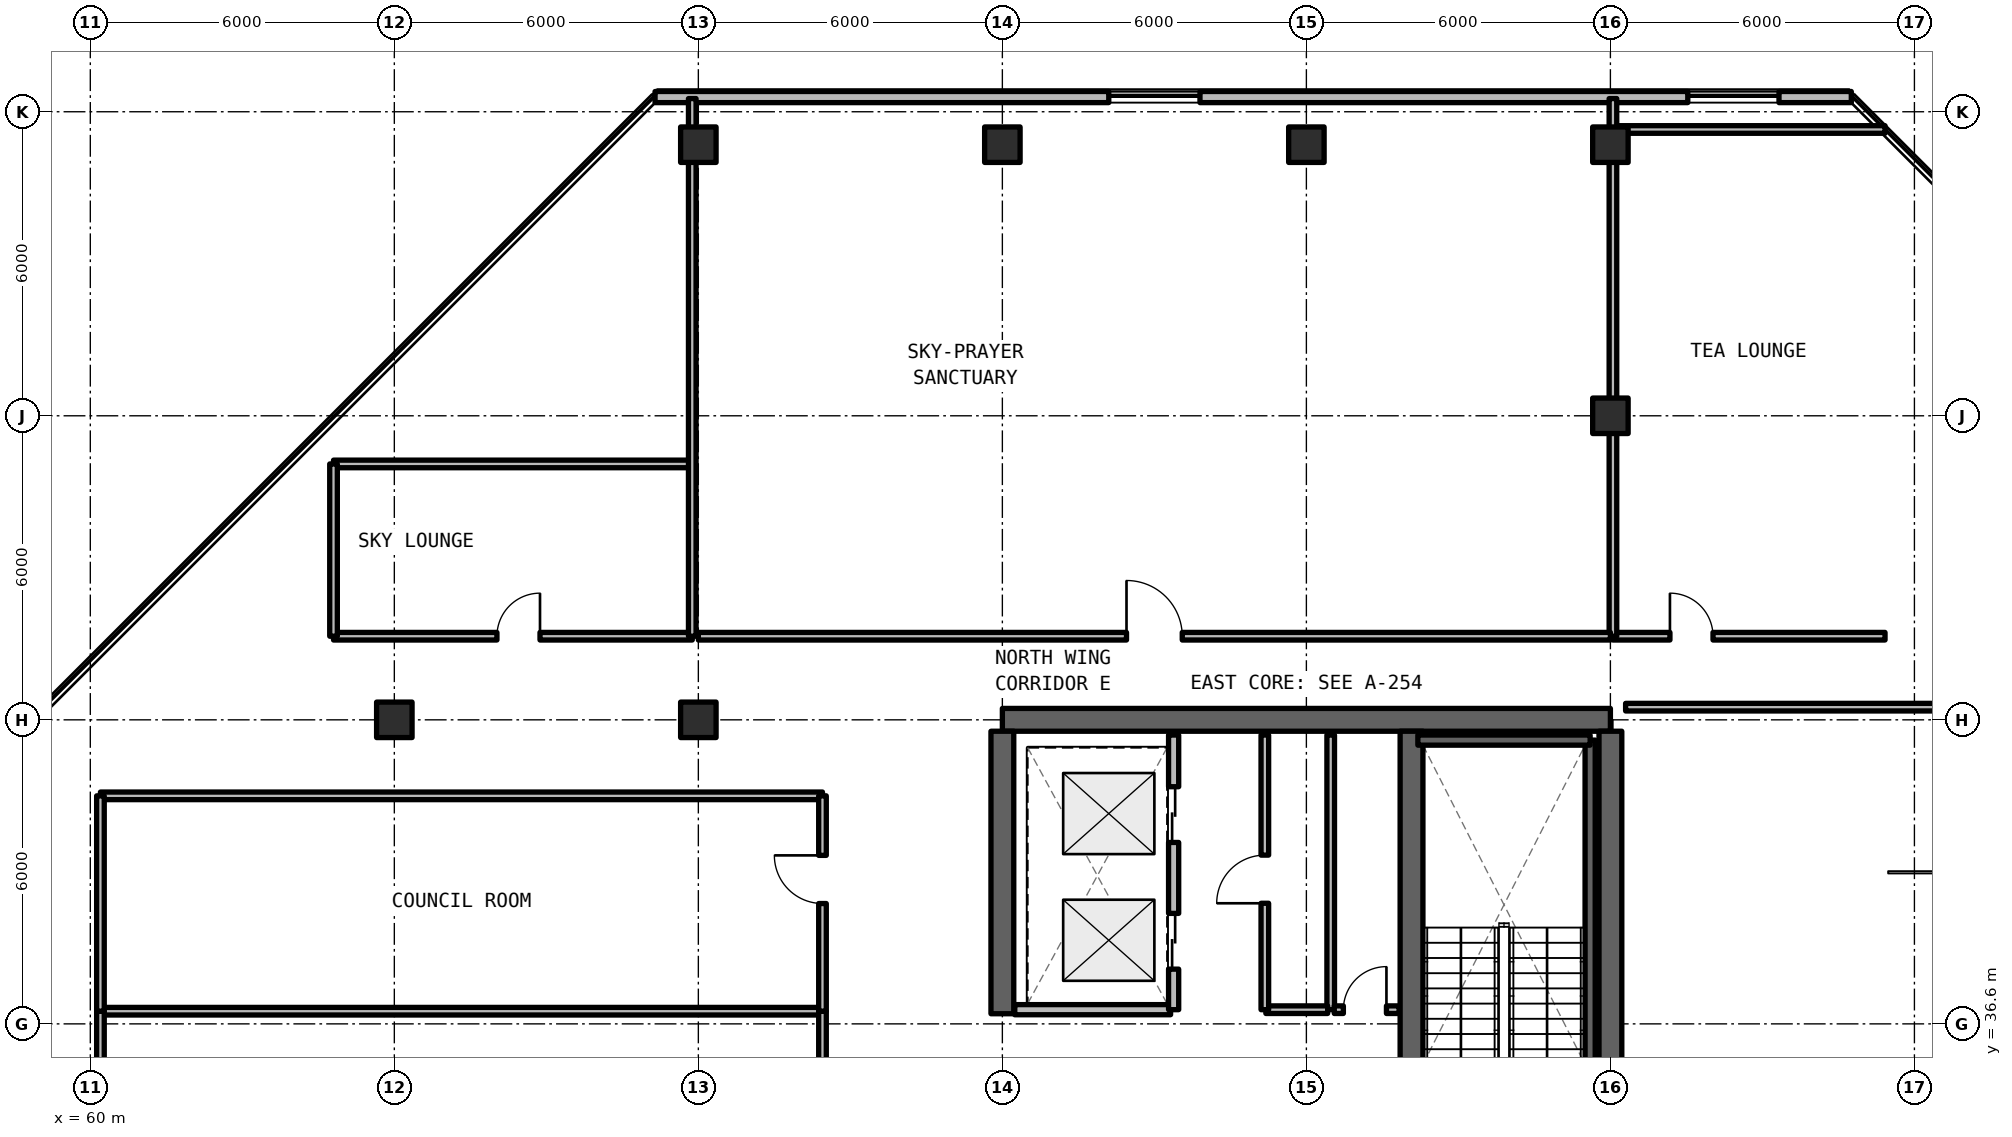
"""IFC4 building model, lengths in metres.
Left out: names, types, materials, properties, quantities, classifications, styles, units other than length and angle.
Written with IfcOpenShell. Run it as: python <this file> out.ifc"""

import sys

from ifc_helpers import new_model, si_unit, direction, frame, frame_2d, origin, origin_2d, place, context, subcontext, project, spatial, rectangle, extrude, element, fill, save


model = new_model("IFC4")
c1 = context("Model", 3, precision=1e-05, world=origin(), true_north=direction((0.0, 1.0)))
c2 = subcontext(c1, "Body", "Model", "MODEL_VIEW")
j1 = project(units=[si_unit("LENGTHUNIT", "METRE"), si_unit("PLANEANGLEUNIT", "RADIAN")], contexts=[c1])
p1 = place(None, origin())
s1 = spatial("IfcSite", under=j1, at=p1, CompositionType="ELEMENT")
p2 = place(p1, origin())
s2 = spatial("IfcBuilding", under=s1, at=p2, CompositionType="ELEMENT")
p3 = place(p2, frame((0.0, 0.0, 235.95)))
s3 = spatial("IfcBuildingStorey", under=s2, at=p3, CompositionType="ELEMENT", Elevation=235.95)
p4 = place(p3, frame((90.0, 42.6, 0.0), z_axis=(0.0, 0.0, 1.0), x_axis=(-1.0, 0.0, 0.0)))
e1 = element("IfcWall", 1, at=p4, inside=s3, PredefinedType="SHEAR", context=c2, shape_type="SweptSolid", body=[
    extrude(rectangle(XDim=12.0, YDim=0.45, at=frame_2d((6.0, 0.0))), origin(), (0.0, 0.0, 1.0), 3.3),
])
p5 = place(p3, frame((90.0, 24.825, 0.0), z_axis=(0.0, 0.0, 1.0), x_axis=(0.0, 1.0, 0.0)))
e2 = element("IfcWall", 2, at=p5, inside=s3, PredefinedType="SHEAR", context=c2, shape_type="SweptSolid", body=[
    extrude(rectangle(XDim=17.55, YDim=0.45, at=frame_2d((8.775, 0.0))), origin(), (0.0, 0.0, 1.0), 3.3),
])
p6 = place(p3, frame((78.0, 36.8, 0.0), z_axis=(0.0, 0.0, 1.0), x_axis=(0.0, 1.0, 0.0)))
e3 = element("IfcWall", 3, at=p6, inside=s3, PredefinedType="SHEAR", context=c2, shape_type="SweptSolid", body=[
    extrude(rectangle(XDim=5.575, YDim=0.45, at=frame_2d((2.788, 0.0))), origin(), (0.0, 0.0, 1.0), 3.3),
])
p7 = place(p3, frame((86.075, 24.825, 0.0), z_axis=(0.0, 0.0, 1.0), x_axis=(0.0, 1.0, 0.0)))
e4 = element("IfcWall", 4, at=p7, inside=s3, PredefinedType="SHEAR", context=c2, shape_type="SweptSolid", body=[
    extrude(rectangle(XDim=17.55, YDim=0.45, at=frame_2d((8.775, 0.0))), origin(), (0.0, 0.0, 1.0), 3.3),
])
p8 = place(p7, frame((0.425, 0.0, 0.0)))
e5 = element("IfcOpeningElement", 5, at=p8, cuts=e4, PredefinedType="OPENING", context=c2, shape_type="SweptSolid", body=[
    extrude(rectangle(XDim=1.15, YDim=2.15, at=frame_2d((0.575, 1.075))), frame((0.0, 0.235, 0.0), z_axis=(0.0, -1.0, 0.0), x_axis=(1.0, 0.0, 0.0)), (0.0, 0.0, 1.0), 0.47),
])
p9 = place(p7, frame((9.625, 0.0, 0.0)))
e6 = element("IfcOpeningElement", 6, at=p9, cuts=e4, PredefinedType="OPENING", context=c2, shape_type="SweptSolid", body=[
    extrude(rectangle(XDim=1.15, YDim=2.15, at=frame_2d((0.575, 1.075))), frame((0.0, 0.235, 0.0), z_axis=(0.0, -1.0, 0.0), x_axis=(1.0, 0.0, 0.0)), (0.0, 0.0, 1.0), 0.47),
])
for number, where, z_axis, x_axis in (
    (7, (66.0, 42.6, 0.0), (0.0, 0.0, 1.0), (1.0, 0.0, 0.0)),
    (8, (72.0, 42.6, 0.0), (0.0, 0.0, 1.0), (1.0, 0.0, 0.0)),
    (9, (90.0, 48.6, 0.0), (0.0, 0.0, 1.0), (1.0, 0.0, 0.0)),
    (10, (72.0, 53.95, 0.0), (0.0, 0.0, 1.0), (1.0, 0.0, 0.0)),
    (11, (78.0, 53.95, 0.0), (0.0, 0.0, 1.0), (1.0, 0.0, 0.0)),
    (12, (84.0, 53.95, 0.0), (0.0, 0.0, 1.0), (1.0, 0.0, 0.0)),
    (13, (90.0, 53.95, 0.0), (0.0, 0.0, 1.0), (1.0, 0.0, 0.0)),
):
    element("IfcColumn", number, at=place(p3, frame(where, z_axis=z_axis, x_axis=x_axis)), inside=s3, PredefinedType="COLUMN", context=c2, shape_type="SweptSolid", body=[
        extrude(rectangle(XDim=0.7, YDim=0.7, at=origin_2d()), origin(), (0.0, 0.0, 1.0), 3.3),
    ])
p10 = place(p3, frame((94.754, 54.89, 0.0), z_axis=(0.0, 0.0, 1.0), x_axis=(-1.0, 0.0, 0.0)))
e14 = element("IfcWall", 14, at=p10, inside=s3, PredefinedType="SOLIDWALL", context=c2, shape_type="SweptSolid", body=[
    extrude(rectangle(XDim=23.609, YDim=0.22, at=frame_2d((11.804, 0.0))), origin(), (0.0, 0.0, 1.0), 3.08),
])
p11 = place(p10, frame((1.427, 0.0, 0.78)))
e15 = element("IfcOpeningElement", 15, at=p11, cuts=e14, PredefinedType="OPENING", context=c2, shape_type="SweptSolid", body=[
    extrude(rectangle(XDim=1.8, YDim=1.66, at=frame_2d((0.9, 0.83))), frame((0.0, 0.12, 0.0), z_axis=(0.0, -1.0, 0.0), x_axis=(1.0, 0.0, 0.0)), (0.0, 0.0, 1.0), 0.24),
])
p12 = place(p10, frame((12.854, 0.0, 0.78)))
e16 = element("IfcOpeningElement", 16, at=p12, cuts=e14, PredefinedType="OPENING", context=c2, shape_type="SweptSolid", body=[
    extrude(rectangle(XDim=1.8, YDim=1.66, at=frame_2d((0.9, 0.83))), frame((0.0, 0.12, 0.0), z_axis=(0.0, -1.0, 0.0), x_axis=(1.0, 0.0, 0.0)), (0.0, 0.0, 1.0), 0.24),
])
p13 = place(p3, frame((84.48, 36.88, 0.0), z_axis=(0.0, 0.0, 1.0), x_axis=(0.0, 1.0, 0.0)))
e17 = element("IfcWall", 17, at=p13, inside=s3, PredefinedType="SOLIDWALL", context=c2, shape_type="SweptSolid", body=[
    extrude(rectangle(XDim=5.42, YDim=0.15, at=frame_2d((2.71, 0.0))), origin(), (0.0, 0.0, 1.0), 2.35),
])
p14 = place(p3, frame((84.55, 36.88, 0.0), z_axis=(0.0, 0.0, 1.0), x_axis=(1.0, 0.0, 0.0)))
e18 = element("IfcWall", 18, at=p14, inside=s3, PredefinedType="SOLIDWALL", context=c2, shape_type="SweptSolid", body=[
    extrude(rectangle(XDim=1.28, YDim=0.15, at=frame_2d((0.64, 0.0))), origin(), (0.0, 0.0, 1.0), 2.35),
])
p15 = place(p14, frame((0.18, 0.0, 0.0)))
e19 = element("IfcOpeningElement", 19, at=p15, cuts=e18, PredefinedType="OPENING", context=c2, shape_type="SweptSolid", body=[
    extrude(rectangle(XDim=0.85, YDim=2.1, at=frame_2d((0.425, 1.05))), frame((0.0, 0.085, 0.0), z_axis=(0.0, -1.0, 0.0), x_axis=(1.0, 0.0, 0.0)), (0.0, 0.0, 1.0), 0.17),
])
p16 = place(p3, frame((83.2, 36.88, 0.0), z_axis=(0.0, 0.0, 1.0), x_axis=(1.0, 0.0, 0.0)))
e20 = element("IfcWall", 20, at=p16, inside=s3, PredefinedType="SOLIDWALL", context=c2, shape_type="SweptSolid", body=[
    extrude(rectangle(XDim=1.22, YDim=0.15, at=frame_2d((0.61, 0.0))), origin(), (0.0, 0.0, 1.0), 2.35),
])
p17 = place(p3, frame((83.18, 36.88, 0.0), z_axis=(0.0, 0.0, 1.0), x_axis=(0.0, 1.0, 0.0)))
e21 = element("IfcWall", 21, at=p17, inside=s3, PredefinedType="SOLIDWALL", context=c2, shape_type="SweptSolid", body=[
    extrude(rectangle(XDim=5.42, YDim=0.15, at=frame_2d((2.71, 0.0))), origin(), (0.0, 0.0, 1.0), 2.35),
])
p18 = place(p17, frame((2.1, 0.0, 0.0)))
e22 = element("IfcOpeningElement", 22, at=p18, cuts=e21, PredefinedType="OPENING", context=c2, shape_type="SweptSolid", body=[
    extrude(rectangle(XDim=0.95, YDim=2.15, at=frame_2d((0.475, 1.075))), frame((0.0, 0.085, 0.0), z_axis=(0.0, -1.0, 0.0), x_axis=(1.0, 0.0, 0.0)), (0.0, 0.0, 1.0), 0.17),
])
p19 = place(p3, frame((78.245, 36.88, 0.0), z_axis=(0.0, 0.0, 1.0), x_axis=(1.0, 0.0, 0.0)))
e23 = element("IfcWall", 23, at=p19, inside=s3, PredefinedType="SOLIDWALL", context=c2, shape_type="SweptSolid", body=[
    extrude(rectangle(XDim=3.075, YDim=0.2, at=frame_2d((1.538, 0.0))), origin(), (0.0, 0.0, 1.0), 2.35),
])
p20 = place(p3, frame((81.38, 36.88, 0.0), z_axis=(0.0, 0.0, 1.0), x_axis=(0.0, 1.0, 0.0)))
e24 = element("IfcWall", 24, at=p20, inside=s3, PredefinedType="SOLIDWALL", context=c2, shape_type="SweptSolid", body=[
    extrude(rectangle(XDim=5.42, YDim=0.2, at=frame_2d((2.71, 0.0))), origin(), (0.0, 0.0, 1.0), 2.35),
])
p21 = place(p20, frame((0.8, 0.0, 0.0)))
e25 = element("IfcOpeningElement", 25, at=p21, cuts=e24, PredefinedType="OPENING", context=c2, shape_type="SweptSolid", body=[
    extrude(rectangle(XDim=1.1, YDim=2.2, at=frame_2d((0.55, 1.1))), frame((0.0, 0.11, 0.0), z_axis=(0.0, -1.0, 0.0), x_axis=(1.0, 0.0, 0.0)), (0.0, 0.0, 1.0), 0.22),
])
p22 = place(p20, frame((3.3, 0.0, 0.0)))
e26 = element("IfcOpeningElement", 26, at=p22, cuts=e24, PredefinedType="OPENING", context=c2, shape_type="SweptSolid", body=[
    extrude(rectangle(XDim=1.1, YDim=2.2, at=frame_2d((0.55, 1.1))), frame((0.0, 0.11, 0.0), z_axis=(0.0, -1.0, 0.0), x_axis=(1.0, 0.0, 0.0)), (0.0, 0.0, 1.0), 0.22),
])
p23 = place(p3, frame((64.8, 44.25, 0.0), z_axis=(0.0, 0.0, 1.0), x_axis=(1.0, 0.0, 0.0)))
e27 = element("IfcWall", 27, at=p23, inside=s3, PredefinedType="SOLIDWALL", context=c2, shape_type="SweptSolid", body=[
    extrude(rectangle(XDim=7.08, YDim=0.15, at=frame_2d((3.54, 0.0))), origin(), (0.0, 0.0, 1.0), 2.35),
])
p24 = place(p23, frame((3.225, 0.0, 0.0)))
e28 = element("IfcOpeningElement", 28, at=p24, cuts=e27, PredefinedType="OPENING", context=c2, shape_type="SweptSolid", body=[
    extrude(rectangle(XDim=0.85, YDim=2.1, at=frame_2d((0.425, 1.05))), frame((0.0, 0.085, 0.0), z_axis=(0.0, -1.0, 0.0), x_axis=(1.0, 0.0, 0.0)), (0.0, 0.0, 1.0), 0.17),
])
p25 = place(p3, frame((64.8, 47.65, 0.0), z_axis=(0.0, 0.0, 1.0), x_axis=(1.0, 0.0, 0.0)))
e29 = element("IfcWall", 29, at=p25, inside=s3, PredefinedType="SOLIDWALL", context=c2, shape_type="SweptSolid", body=[
    extrude(rectangle(XDim=7.08, YDim=0.15, at=frame_2d((3.54, 0.0))), origin(), (0.0, 0.0, 1.0), 2.35),
])
p26 = place(p3, frame((64.8, 44.25, 0.0), z_axis=(0.0, 0.0, 1.0), x_axis=(0.0, 1.0, 0.0)))
e30 = element("IfcWall", 30, at=p26, inside=s3, PredefinedType="SOLIDWALL", context=c2, shape_type="SweptSolid", body=[
    extrude(rectangle(XDim=3.4, YDim=0.15, at=frame_2d((1.7, 0.0))), origin(), (0.0, 0.0, 1.0), 2.35),
])
p27 = place(p3, frame((71.88, 44.25, 0.0), z_axis=(0.0, 0.0, 1.0), x_axis=(0.0, 1.0, 0.0)))
e31 = element("IfcWall", 31, at=p27, inside=s3, PredefinedType="SOLIDWALL", context=c2, shape_type="SweptSolid", body=[
    extrude(rectangle(XDim=10.61, YDim=0.15, at=frame_2d((5.305, 0.0))), origin(), (0.0, 0.0, 1.0), 2.35),
])
p28 = place(p3, frame((90.3, 42.85, 0.0), z_axis=(0.0, 0.0, 1.0), x_axis=(1.0, 0.0, 0.0)))
e32 = element("IfcWall", 32, at=p28, inside=s3, PredefinedType="SOLIDWALL", context=c2, shape_type="SweptSolid", body=[
    extrude(rectangle(XDim=8.52, YDim=0.15, at=frame_2d((4.26, 0.0))), origin(), (0.0, 0.0, 1.0), 2.35),
])
p29 = place(p3, frame((90.05, 44.25, 0.0), z_axis=(0.0, 0.0, 1.0), x_axis=(1.0, 0.0, 0.0)))
e33 = element("IfcWall", 33, at=p29, inside=s3, PredefinedType="SOLIDWALL", context=c2, shape_type="SweptSolid", body=[
    extrude(rectangle(XDim=5.37, YDim=0.15, at=frame_2d((2.685, 0.0))), origin(), (0.0, 0.0, 1.0), 2.35),
])
p30 = place(p29, frame((1.125, 0.0, 0.0)))
e34 = element("IfcOpeningElement", 34, at=p30, cuts=e33, PredefinedType="OPENING", context=c2, shape_type="SweptSolid", body=[
    extrude(rectangle(XDim=0.85, YDim=2.1, at=frame_2d((0.425, 1.05))), frame((0.0, 0.085, 0.0), z_axis=(0.0, -1.0, 0.0), x_axis=(1.0, 0.0, 0.0)), (0.0, 0.0, 1.0), 0.17),
])
p31 = place(p3, frame((90.05, 54.25, 0.0), z_axis=(0.0, 0.0, 1.0), x_axis=(1.0, 0.0, 0.0)))
e35 = element("IfcWall", 35, at=p31, inside=s3, PredefinedType="SOLIDWALL", context=c2, shape_type="SweptSolid", body=[
    extrude(rectangle(XDim=5.37, YDim=0.15, at=frame_2d((2.685, 0.0))), origin(), (0.0, 0.0, 1.0), 2.35),
])
p32 = place(p3, frame((90.05, 44.25, 0.0), z_axis=(0.0, 0.0, 1.0), x_axis=(0.0, 1.0, 0.0)))
e36 = element("IfcWall", 36, at=p32, inside=s3, PredefinedType="SOLIDWALL", context=c2, shape_type="SweptSolid", body=[
    extrude(rectangle(XDim=10.61, YDim=0.15, at=frame_2d((5.305, 0.0))), origin(), (0.0, 0.0, 1.0), 2.35),
])
p33 = place(p3, frame((72.0, 44.25, 0.0), z_axis=(0.0, 0.0, 1.0), x_axis=(1.0, 0.0, 0.0)))
e37 = element("IfcWall", 37, at=p33, inside=s3, PredefinedType="SOLIDWALL", context=c2, shape_type="SweptSolid", body=[
    extrude(rectangle(XDim=18.0, YDim=0.15, at=frame_2d((9.0, 0.0))), origin(), (0.0, 0.0, 1.0), 2.35),
])
p34 = place(p33, frame((8.45, 0.0, 0.0)))
e38 = element("IfcOpeningElement", 38, at=p34, cuts=e37, PredefinedType="OPENING", context=c2, shape_type="SweptSolid", body=[
    extrude(rectangle(XDim=1.1, YDim=2.15, at=frame_2d((0.55, 1.075))), frame((0.0, 0.085, 0.0), z_axis=(0.0, -1.0, 0.0), x_axis=(1.0, 0.0, 0.0)), (0.0, 0.0, 1.0), 0.17),
])
p35 = place(p3, frame((60.2, 36.85, 0.0), z_axis=(0.0, 0.0, 1.0), x_axis=(1.0, 0.0, 0.0)))
e39 = element("IfcWall", 39, at=p35, inside=s3, PredefinedType="SOLIDWALL", context=c2, shape_type="SweptSolid", body=[
    extrude(rectangle(XDim=14.25, YDim=0.15, at=frame_2d((7.125, 0.0))), origin(), (0.0, 0.0, 1.0), 2.35),
])
p36 = place(p3, frame((60.2, 31.25, 0.0), z_axis=(0.0, 0.0, 1.0), x_axis=(0.0, 1.0, 0.0)))
e40 = element("IfcWall", 40, at=p36, inside=s3, PredefinedType="SOLIDWALL", context=c2, shape_type="SweptSolid", body=[
    extrude(rectangle(XDim=5.6, YDim=0.15, at=frame_2d((2.8, 0.0))), origin(), (0.0, 0.0, 1.0), 2.35),
])
p37 = place(p3, frame((74.45, 31.25, 0.0), z_axis=(0.0, 0.0, 1.0), x_axis=(0.0, 1.0, 0.0)))
e41 = element("IfcWall", 41, at=p37, inside=s3, PredefinedType="SOLIDWALL", context=c2, shape_type="SweptSolid", body=[
    extrude(rectangle(XDim=5.6, YDim=0.15, at=frame_2d((2.8, 0.0))), origin(), (0.0, 0.0, 1.0), 2.35),
])
p38 = place(p37, frame((2.525, 0.0, 0.0)))
e42 = element("IfcOpeningElement", 42, at=p38, cuts=e41, PredefinedType="OPENING", context=c2, shape_type="SweptSolid", body=[
    extrude(rectangle(XDim=0.95, YDim=2.15, at=frame_2d((0.475, 1.075))), frame((0.0, 0.085, 0.0), z_axis=(0.0, -1.0, 0.0), x_axis=(1.0, 0.0, 0.0)), (0.0, 0.0, 1.0), 0.17),
])
p39 = place(p3, frame((60.2, 41.1, 0.0), z_axis=(0.0, 0.0, 1.0), x_axis=(1.0, 0.0, 0.0)))
e43 = element("IfcWall", 43, at=p39, inside=s3, PredefinedType="SOLIDWALL", context=c2, shape_type="SweptSolid", body=[
    extrude(rectangle(XDim=14.25, YDim=0.15, at=frame_2d((7.125, 0.0))), origin(), (0.0, 0.0, 1.0), 2.35),
])
p40 = place(p3, frame((60.2, 36.85, 0.0), z_axis=(0.0, 0.0, 1.0), x_axis=(0.0, 1.0, 0.0)))
e44 = element("IfcWall", 44, at=p40, inside=s3, PredefinedType="SOLIDWALL", context=c2, shape_type="SweptSolid", body=[
    extrude(rectangle(XDim=4.25, YDim=0.15, at=frame_2d((2.125, 0.0))), origin(), (0.0, 0.0, 1.0), 2.35),
])
p41 = place(p3, frame((74.45, 36.85, 0.0), z_axis=(0.0, 0.0, 1.0), x_axis=(0.0, 1.0, 0.0)))
e45 = element("IfcWall", 45, at=p41, inside=s3, PredefinedType="SOLIDWALL", context=c2, shape_type="SweptSolid", body=[
    extrude(rectangle(XDim=4.25, YDim=0.15, at=frame_2d((2.125, 0.0))), origin(), (0.0, 0.0, 1.0), 2.35),
])
p42 = place(p41, frame((2.125, 0.0, 0.0)))
e46 = element("IfcOpeningElement", 46, at=p42, cuts=e45, PredefinedType="OPENING", context=c2, shape_type="SweptSolid", body=[
    extrude(rectangle(XDim=0.95, YDim=2.15, at=frame_2d((0.475, 1.075))), frame((0.0, 0.085, 0.0), z_axis=(0.0, -1.0, 0.0), x_axis=(1.0, 0.0, 0.0)), (0.0, 0.0, 1.0), 0.17),
])
p43 = place(p3, frame((89.6, 34.2, 0.0), z_axis=(0.0, 0.0, 1.0), x_axis=(0.0, 1.0, 0.0)))
e47 = element("IfcWall", 47, at=p43, inside=s3, PredefinedType="SOLIDWALL", context=c2, shape_type="SweptSolid", body=[
    extrude(rectangle(XDim=8.0, YDim=0.2, at=frame_2d((4.0, 0.0))), origin(), (0.0, 0.0, 1.0), 3.3),
])
p44 = place(p3, frame((89.6, 42.2, 0.0), z_axis=(0.0, 0.0, 1.0), x_axis=(-1.0, 0.0, 0.0)))
e48 = element("IfcWall", 48, at=p44, inside=s3, PredefinedType="SOLIDWALL", context=c2, shape_type="SweptSolid", body=[
    extrude(rectangle(XDim=3.4, YDim=0.2, at=frame_2d((1.7, 0.0))), origin(), (0.0, 0.0, 1.0), 3.3),
])
p45 = place(p11, origin())
e49 = element("IfcWindow", 49, at=p45, inside=s3, PartitioningType="SINGLE_PANEL", PredefinedType="WINDOW", context=c2, shape_type="SweptSolid", body=[
    extrude(rectangle(XDim=1.8, YDim=1.66, at=frame_2d((0.9, 0.83))), frame((0.0, 0.03, 0.0), z_axis=(0.0, -1.0, 0.0), x_axis=(1.0, 0.0, 0.0)), (0.0, 0.0, 1.0), 0.06),
])
fill(e15, e49)
p46 = place(p12, origin())
e50 = element("IfcWindow", 50, at=p46, inside=s3, PartitioningType="SINGLE_PANEL", PredefinedType="WINDOW", context=c2, shape_type="SweptSolid", body=[
    extrude(rectangle(XDim=1.8, YDim=1.66, at=frame_2d((0.9, 0.83))), frame((0.0, 0.03, 0.0), z_axis=(0.0, -1.0, 0.0), x_axis=(1.0, 0.0, 0.0)), (0.0, 0.0, 1.0), 0.06),
])
fill(e16, e50)
p47 = place(p15, origin())
e51 = element("IfcDoor", 51, at=p47, inside=s3, OperationType="SINGLE_SWING_RIGHT", PredefinedType="DOOR", context=c2, shape_type="SweptSolid", body=[
    extrude(rectangle(XDim=0.85, YDim=2.1, at=frame_2d((0.425, 1.05))), frame((0.0, 0.025, 0.0), z_axis=(0.0, -1.0, 0.0), x_axis=(1.0, 0.0, 0.0)), (0.0, 0.0, 1.0), 0.05),
])
fill(e19, e51)
p48 = place(p18, origin())
e52 = element("IfcDoor", 52, at=p48, inside=s3, OperationType="SINGLE_SWING_LEFT", PredefinedType="DOOR", context=c2, shape_type="SweptSolid", body=[
    extrude(rectangle(XDim=0.95, YDim=2.15, at=frame_2d((0.475, 1.075))), frame((0.0, 0.025, 0.0), z_axis=(0.0, -1.0, 0.0), x_axis=(1.0, 0.0, 0.0)), (0.0, 0.0, 1.0), 0.05),
])
fill(e22, e52)
p49 = place(p21, origin())
e53 = element("IfcDoor", 53, at=p49, inside=s3, OperationType="SLIDING_TO_LEFT", PredefinedType="DOOR", context=c2, shape_type="SweptSolid", body=[
    extrude(rectangle(XDim=1.1, YDim=2.2, at=frame_2d((0.55, 1.1))), frame((0.0, 0.025, 0.0), z_axis=(0.0, -1.0, 0.0), x_axis=(1.0, 0.0, 0.0)), (0.0, 0.0, 1.0), 0.05),
])
fill(e25, e53)
p50 = place(p22, origin())
e54 = element("IfcDoor", 54, at=p50, inside=s3, OperationType="SLIDING_TO_RIGHT", PredefinedType="DOOR", context=c2, shape_type="SweptSolid", body=[
    extrude(rectangle(XDim=1.1, YDim=2.2, at=frame_2d((0.55, 1.1))), frame((0.0, 0.025, 0.0), z_axis=(0.0, -1.0, 0.0), x_axis=(1.0, 0.0, 0.0)), (0.0, 0.0, 1.0), 0.05),
])
fill(e26, e54)
p51 = place(p24, origin())
e55 = element("IfcDoor", 55, at=p51, inside=s3, OperationType="SINGLE_SWING_RIGHT", PredefinedType="DOOR", context=c2, shape_type="SweptSolid", body=[
    extrude(rectangle(XDim=0.85, YDim=2.1, at=frame_2d((0.425, 1.05))), frame((0.0, 0.025, 0.0), z_axis=(0.0, -1.0, 0.0), x_axis=(1.0, 0.0, 0.0)), (0.0, 0.0, 1.0), 0.05),
])
fill(e28, e55)
p52 = place(p30, origin())
e56 = element("IfcDoor", 56, at=p52, inside=s3, OperationType="SINGLE_SWING_LEFT", PredefinedType="DOOR", context=c2, shape_type="SweptSolid", body=[
    extrude(rectangle(XDim=0.85, YDim=2.1, at=frame_2d((0.425, 1.05))), frame((0.0, 0.025, 0.0), z_axis=(0.0, -1.0, 0.0), x_axis=(1.0, 0.0, 0.0)), (0.0, 0.0, 1.0), 0.05),
])
fill(e34, e56)
p53 = place(p34, origin())
e57 = element("IfcDoor", 57, at=p53, inside=s3, OperationType="SINGLE_SWING_LEFT", PredefinedType="DOOR", context=c2, shape_type="SweptSolid", body=[
    extrude(rectangle(XDim=1.1, YDim=2.15, at=frame_2d((0.55, 1.075))), frame((0.0, 0.025, 0.0), z_axis=(0.0, -1.0, 0.0), x_axis=(1.0, 0.0, 0.0)), (0.0, 0.0, 1.0), 0.05),
])
fill(e38, e57)
p54 = place(p42, origin())
e58 = element("IfcDoor", 58, at=p54, inside=s3, OperationType="SINGLE_SWING_RIGHT", PredefinedType="DOOR", context=c2, shape_type="SweptSolid", body=[
    extrude(rectangle(XDim=0.95, YDim=2.15, at=frame_2d((0.475, 1.075))), frame((0.0, 0.025, 0.0), z_axis=(0.0, -1.0, 0.0), x_axis=(1.0, 0.0, 0.0)), (0.0, 0.0, 1.0), 0.05),
])
fill(e46, e58)
save(model, sys.argv[1])
